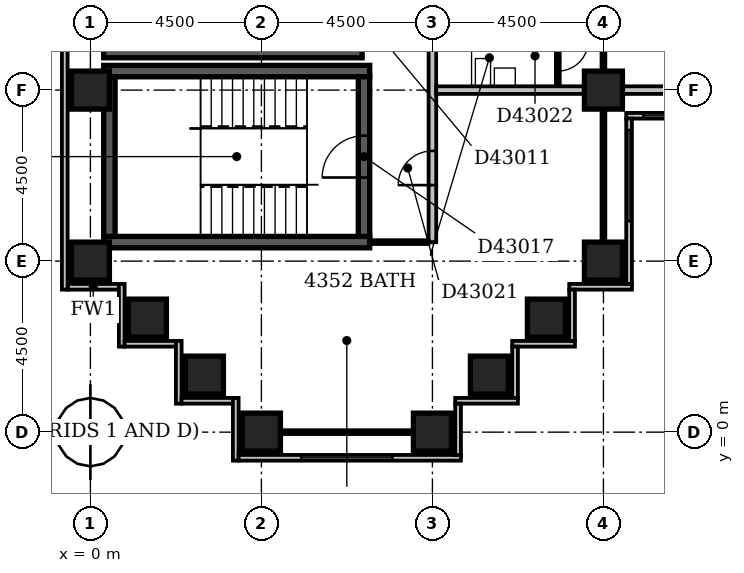
"""IFC4 building model, lengths in metres.
Left out: names, types, materials, properties, quantities, classifications, styles, units other than length and angle.
Written with IfcOpenShell. Run it as: python <this file> out.ifc"""

import sys

from ifc_helpers import new_model, si_unit, direction, frame, frame_2d, origin, origin_2d, place, context, subcontext, project, spatial, rectangle, extrude, element, fill, save


model = new_model("IFC4")
c1 = context("Model", 3, precision=1e-05, world=origin(), true_north=direction((0.0, 1.0)))
c2 = subcontext(c1, "Body", "Model", "MODEL_VIEW")
j1 = project(units=[si_unit("LENGTHUNIT", "METRE"), si_unit("PLANEANGLEUNIT", "RADIAN")], contexts=[c1])
p1 = place(None, origin())
s1 = spatial("IfcSite", under=j1, at=p1, CompositionType="ELEMENT")
p2 = place(p1, origin())
s2 = spatial("IfcBuilding", under=s1, at=p2, CompositionType="ELEMENT")
p3 = place(p2, frame((0.0, 0.0, 170.0)))
s3 = spatial("IfcBuildingStorey", under=s2, at=p3, CompositionType="ELEMENT", Elevation=170.0)
for number, where, z_axis, x_axis in (
    (1, (0.35, 5.0, -0.3), (0.0, 0.0, 1.0), (1.0, 0.0, 0.0)),
    (2, (0.35, 9.5, -0.3), (0.0, 0.0, 1.0), (1.0, 0.0, 0.0)),
):
    element("IfcWall", number, at=place(p3, frame(where, z_axis=z_axis, x_axis=x_axis)), inside=s3, PredefinedType="SHEAR", context=c2, shape_type="SweptSolid", body=[
        extrude(rectangle(XDim=7.0, YDim=0.3, at=frame_2d((3.5, 0.0))), origin(), (0.0, 0.0, 1.0), 3.45),
    ])
p4 = place(p3, frame((0.35, 10.0, -0.3), z_axis=(0.0, 0.0, 1.0), x_axis=(1.0, 0.0, 0.0)))
e3 = element("IfcWall", 3, at=p4, inside=s3, PredefinedType="SHEAR", context=c2, shape_type="SweptSolid", body=[
    extrude(rectangle(XDim=6.8, YDim=0.3, at=frame_2d((3.4, 0.0))), origin(), (0.0, 0.0, 1.0), 3.45),
])
p5 = place(p3, frame((0.5, 5.15, -0.3), z_axis=(0.0, 0.0, 1.0), x_axis=(0.0, 1.0, 0.0)))
e4 = element("IfcWall", 4, at=p5, inside=s3, PredefinedType="SHEAR", context=c2, shape_type="SweptSolid", body=[
    extrude(rectangle(XDim=4.2, YDim=0.3, at=frame_2d((2.1, 0.0))), origin(), (0.0, 0.0, 1.0), 3.45),
])
p6 = place(p3, frame((7.2, 5.15, -0.3), z_axis=(0.0, 0.0, 1.0), x_axis=(0.0, 1.0, 0.0)))
e5 = element("IfcWall", 5, at=p6, inside=s3, PredefinedType="SHEAR", context=c2, shape_type="SweptSolid", body=[
    extrude(rectangle(XDim=4.2, YDim=0.3, at=frame_2d((2.1, 0.0))), origin(), (0.0, 0.0, 1.0), 3.45),
])
p7 = place(p6, frame((1.55, 0.0, 0.3)))
e6 = element("IfcOpeningElement", 6, at=p7, cuts=e5, PredefinedType="OPENING", context=c2, shape_type="SweptSolid", body=[
    extrude(rectangle(XDim=1.1, YDim=2.1, at=frame_2d((0.55, 1.05))), frame((0.0, 0.162, 0.0), z_axis=(0.0, -1.0, 0.0), x_axis=(1.0, 0.0, 0.0)), (0.0, 0.0, 1.0), 0.324),
])
for number, where, z_axis, x_axis in (
    (7, (4.5, 0.0, -0.3), (0.0, 0.0, 1.0), (1.0, 0.0, 0.0)),
    (8, (9.0, 0.0, -0.3), (0.0, 0.0, 1.0), (1.0, 0.0, 0.0)),
    (9, (3.0, 1.5, -0.3), (0.0, 0.0, 1.0), (1.0, 0.0, 0.0)),
    (10, (10.5, 1.5, -0.3), (0.0, 0.0, 1.0), (1.0, 0.0, 0.0)),
    (11, (1.5, 3.0, -0.3), (0.0, 0.0, 1.0), (1.0, 0.0, 0.0)),
    (12, (12.0, 3.0, -0.3), (0.0, 0.0, 1.0), (1.0, 0.0, 0.0)),
    (13, (0.0, 4.5, -0.3), (0.0, 0.0, 1.0), (1.0, 0.0, 0.0)),
    (14, (13.5, 4.5, -0.3), (0.0, 0.0, 1.0), (1.0, 0.0, 0.0)),
    (15, (0.0, 9.0, -0.3), (0.0, 0.0, 1.0), (1.0, 0.0, 0.0)),
    (16, (13.5, 9.0, -0.3), (0.0, 0.0, 1.0), (1.0, 0.0, 0.0)),
):
    element("IfcColumn", number, at=place(p3, frame(where, z_axis=z_axis, x_axis=x_axis)), inside=s3, PredefinedType="COLUMN", context=c2, shape_type="SweptSolid", body=[
        extrude(rectangle(XDim=1.0, YDim=1.0, at=origin_2d()), origin(), (0.0, 0.0, 1.0), 3.45),
    ])
p8 = place(p3, frame((9.675, -0.6, 0.0), z_axis=(0.0, 0.0, 1.0), x_axis=(0.0, 1.0, 0.0)))
e17 = element("IfcWall", 17, at=p8, inside=s3, PredefinedType="STANDARD", context=c2, shape_type="SweptSolid", body=[
    extrude(rectangle(XDim=1.35, YDim=0.15, at=frame_2d((0.675, 0.0))), origin(), (0.0, 0.0, 1.0), 2.5),
])
p9 = place(p3, frame((9.6, 0.825, 0.0), z_axis=(0.0, 0.0, 1.0), x_axis=(1.0, 0.0, 0.0)))
e18 = element("IfcWall", 18, at=p9, inside=s3, PredefinedType="STANDARD", context=c2, shape_type="SweptSolid", body=[
    extrude(rectangle(XDim=1.65, YDim=0.15, at=frame_2d((0.825, 0.0))), origin(), (0.0, 0.0, 1.0), 2.5),
])
p10 = place(p3, frame((11.175, 0.9, 0.0), z_axis=(0.0, 0.0, 1.0), x_axis=(0.0, 1.0, 0.0)))
e19 = element("IfcWall", 19, at=p10, inside=s3, PredefinedType="STANDARD", context=c2, shape_type="SweptSolid", body=[
    extrude(rectangle(XDim=1.35, YDim=0.15, at=frame_2d((0.675, 0.0))), origin(), (0.0, 0.0, 1.0), 2.5),
])
p11 = place(p3, frame((11.1, 2.325, 0.0), z_axis=(0.0, 0.0, 1.0), x_axis=(1.0, 0.0, 0.0)))
e20 = element("IfcWall", 20, at=p11, inside=s3, PredefinedType="STANDARD", context=c2, shape_type="SweptSolid", body=[
    extrude(rectangle(XDim=1.65, YDim=0.15, at=frame_2d((0.825, 0.0))), origin(), (0.0, 0.0, 1.0), 2.5),
])
p12 = place(p3, frame((12.675, 2.4, 0.0), z_axis=(0.0, 0.0, 1.0), x_axis=(0.0, 1.0, 0.0)))
e21 = element("IfcWall", 21, at=p12, inside=s3, PredefinedType="STANDARD", context=c2, shape_type="SweptSolid", body=[
    extrude(rectangle(XDim=1.35, YDim=0.15, at=frame_2d((0.675, 0.0))), origin(), (0.0, 0.0, 1.0), 2.5),
])
p13 = place(p3, frame((12.6, 3.825, 0.0), z_axis=(0.0, 0.0, 1.0), x_axis=(1.0, 0.0, 0.0)))
e22 = element("IfcWall", 22, at=p13, inside=s3, PredefinedType="STANDARD", context=c2, shape_type="SweptSolid", body=[
    extrude(rectangle(XDim=1.65, YDim=0.15, at=frame_2d((0.825, 0.0))), origin(), (0.0, 0.0, 1.0), 2.5),
])
p14 = place(p3, frame((14.175, 3.9, 0.0), z_axis=(0.0, 0.0, 1.0), x_axis=(0.0, 1.0, 0.0)))
e23 = element("IfcWall", 23, at=p14, inside=s3, PredefinedType="STANDARD", context=c2, shape_type="SweptSolid", body=[
    extrude(rectangle(XDim=4.35, YDim=0.15, at=frame_2d((2.175, 0.0))), origin(), (0.0, 0.0, 1.0), 2.5),
])
p15 = place(p14, frame((1.65, 0.0, 0.6)))
e24 = element("IfcOpeningElement", 24, at=p15, cuts=e23, PredefinedType="OPENING", context=c2, shape_type="SweptSolid", body=[
    extrude(rectangle(XDim=2.4, YDim=1.8, at=frame_2d((1.2, 0.9))), frame((0.0, 0.087, 0.0), z_axis=(0.0, -1.0, 0.0), x_axis=(1.0, 0.0, 0.0)), (0.0, 0.0, 1.0), 0.174),
])
p16 = place(p3, frame((14.1, 8.325, 0.0), z_axis=(0.0, 0.0, 1.0), x_axis=(1.0, 0.0, 0.0)))
e25 = element("IfcWall", 25, at=p16, inside=s3, PredefinedType="STANDARD", context=c2, shape_type="SweptSolid", body=[
    extrude(rectangle(XDim=4.65, YDim=0.15, at=frame_2d((2.325, 0.0))), origin(), (0.0, 0.0, 1.0), 2.5),
])
p17 = place(p16, frame((0.45, 0.0, 0.6)))
e26 = element("IfcOpeningElement", 26, at=p17, cuts=e25, PredefinedType="OPENING", context=c2, shape_type="SweptSolid", body=[
    extrude(rectangle(XDim=2.4, YDim=1.8, at=frame_2d((1.2, 0.9))), frame((0.0, 0.087, 0.0), z_axis=(0.0, -1.0, 0.0), x_axis=(1.0, 0.0, 0.0)), (0.0, 0.0, 1.0), 0.174),
])
p18 = place(p3, frame((-0.675, 59.1, 0.0), z_axis=(0.0, 0.0, 1.0), x_axis=(0.0, -1.0, 0.0)))
e27 = element("IfcWall", 27, at=p18, inside=s3, PredefinedType="STANDARD", context=c2, shape_type="SweptSolid", body=[
    extrude(rectangle(XDim=55.35, YDim=0.15, at=frame_2d((27.675, 0.0))), origin(), (0.0, 0.0, 1.0), 2.5),
])
p19 = place(p18, frame((42.15, 0.0, 0.6)))
e28 = element("IfcOpeningElement", 28, at=p19, cuts=e27, PredefinedType="OPENING", context=c2, shape_type="SweptSolid", body=[
    extrude(rectangle(XDim=2.4, YDim=1.8, at=frame_2d((1.2, 0.9))), frame((0.0, 0.087, 0.0), z_axis=(0.0, -1.0, 0.0), x_axis=(1.0, 0.0, 0.0)), (0.0, 0.0, 1.0), 0.174),
])
p20 = place(p3, frame((-0.6, 3.825, 0.0), z_axis=(0.0, 0.0, 1.0), x_axis=(1.0, 0.0, 0.0)))
e29 = element("IfcWall", 29, at=p20, inside=s3, PredefinedType="STANDARD", context=c2, shape_type="SweptSolid", body=[
    extrude(rectangle(XDim=1.35, YDim=0.15, at=frame_2d((0.675, 0.0))), origin(), (0.0, 0.0, 1.0), 2.5),
])
p21 = place(p3, frame((0.825, 3.9, 0.0), z_axis=(0.0, 0.0, 1.0), x_axis=(0.0, -1.0, 0.0)))
e30 = element("IfcWall", 30, at=p21, inside=s3, PredefinedType="STANDARD", context=c2, shape_type="SweptSolid", body=[
    extrude(rectangle(XDim=1.65, YDim=0.15, at=frame_2d((0.825, 0.0))), origin(), (0.0, 0.0, 1.0), 2.5),
])
p22 = place(p3, frame((0.9, 2.325, 0.0), z_axis=(0.0, 0.0, 1.0), x_axis=(1.0, 0.0, 0.0)))
e31 = element("IfcWall", 31, at=p22, inside=s3, PredefinedType="STANDARD", context=c2, shape_type="SweptSolid", body=[
    extrude(rectangle(XDim=1.35, YDim=0.15, at=frame_2d((0.675, 0.0))), origin(), (0.0, 0.0, 1.0), 2.5),
])
p23 = place(p3, frame((2.325, 2.4, 0.0), z_axis=(0.0, 0.0, 1.0), x_axis=(0.0, -1.0, 0.0)))
e32 = element("IfcWall", 32, at=p23, inside=s3, PredefinedType="STANDARD", context=c2, shape_type="SweptSolid", body=[
    extrude(rectangle(XDim=1.65, YDim=0.15, at=frame_2d((0.825, 0.0))), origin(), (0.0, 0.0, 1.0), 2.5),
])
p24 = place(p3, frame((2.4, 0.825, 0.0), z_axis=(0.0, 0.0, 1.0), x_axis=(1.0, 0.0, 0.0)))
e33 = element("IfcWall", 33, at=p24, inside=s3, PredefinedType="STANDARD", context=c2, shape_type="SweptSolid", body=[
    extrude(rectangle(XDim=1.35, YDim=0.15, at=frame_2d((0.675, 0.0))), origin(), (0.0, 0.0, 1.0), 2.5),
])
p25 = place(p3, frame((3.825, 0.9, 0.0), z_axis=(0.0, 0.0, 1.0), x_axis=(0.0, -1.0, 0.0)))
e34 = element("IfcWall", 34, at=p25, inside=s3, PredefinedType="STANDARD", context=c2, shape_type="SweptSolid", body=[
    extrude(rectangle(XDim=1.65, YDim=0.15, at=frame_2d((0.825, 0.0))), origin(), (0.0, 0.0, 1.0), 2.5),
])
p26 = place(p3, frame((3.9, -0.675, 0.0), z_axis=(0.0, 0.0, 1.0), x_axis=(1.0, 0.0, 0.0)))
e35 = element("IfcWall", 35, at=p26, inside=s3, PredefinedType="STANDARD", context=c2, shape_type="SweptSolid", body=[
    extrude(rectangle(XDim=5.85, YDim=0.15, at=frame_2d((2.925, 0.0))), origin(), (0.0, 0.0, 1.0), 2.5),
])
p27 = place(p26, frame((1.65, 0.0, 0.6)))
e36 = element("IfcOpeningElement", 36, at=p27, cuts=e35, PredefinedType="OPENING", context=c2, shape_type="SweptSolid", body=[
    extrude(rectangle(XDim=2.4, YDim=1.8, at=frame_2d((1.2, 0.9))), frame((0.0, 0.087, 0.0), z_axis=(0.0, -1.0, 0.0), x_axis=(1.0, 0.0, 0.0)), (0.0, 0.0, 1.0), 0.174),
])
p28 = place(p3, frame((5.0, 0.0, 0.0), z_axis=(0.0, 0.0, 1.0), x_axis=(1.0, 0.0, 0.0)))
e37 = element("IfcWall", 37, at=p28, inside=s3, PredefinedType="PARTITIONING", context=c2, shape_type="SweptSolid", body=[
    extrude(rectangle(XDim=3.5, YDim=0.1, at=frame_2d((1.75, 0.0))), origin(), (0.0, 0.0, 1.0), 2.5),
])
p29 = place(p3, frame((0.0, 4.5, 0.0), z_axis=(0.0, 0.0, 1.0), x_axis=(0.0, 1.0, 0.0)))
e38 = element("IfcWall", 38, at=p29, inside=s3, PredefinedType="PARTITIONING", context=c2, shape_type="SweptSolid", body=[
    extrude(rectangle(XDim=0.5, YDim=0.1, at=frame_2d((0.25, 0.0))), origin(), (0.0, 0.0, 1.0), 2.5),
])
p30 = place(p3, frame((7.349, 5.0, 0.0), z_axis=(0.0, 0.0, 1.0), x_axis=(1.0, 0.0, 0.0)))
e39 = element("IfcWall", 39, at=p30, inside=s3, PredefinedType="PARTITIONING", context=c2, shape_type="SweptSolid", body=[
    extrude(rectangle(XDim=1.551, YDim=0.1, at=frame_2d((0.775, 0.0))), origin(), (0.0, 0.0, 1.0), 3.15),
])
p31 = place(p3, frame((9.0, 5.0, 0.0), z_axis=(0.0, 0.0, 1.0), x_axis=(0.0, 1.0, 0.0)))
e40 = element("IfcWall", 40, at=p31, inside=s3, PredefinedType="PARTITIONING", context=c2, shape_type="SweptSolid", body=[
    extrude(rectangle(XDim=27.75, YDim=0.2, at=frame_2d((13.875, 0.0))), origin(), (0.0, 0.0, 1.0), 3.15),
])
p32 = place(p31, frame((13.3, 0.0, 0.0)))
e41 = element("IfcOpeningElement", 41, at=p32, cuts=e40, PredefinedType="OPENING", context=c2, shape_type="SweptSolid", body=[
    extrude(rectangle(XDim=1.0, YDim=2.1, at=frame_2d((0.5, 1.05))), frame((0.0, 0.112, 0.0), z_axis=(0.0, -1.0, 0.0), x_axis=(1.0, 0.0, 0.0)), (0.0, 0.0, 1.0), 0.224),
])
p33 = place(p31, frame((10.45, 0.0, 0.0)))
e42 = element("IfcOpeningElement", 42, at=p33, cuts=e40, PredefinedType="OPENING", context=c2, shape_type="SweptSolid", body=[
    extrude(rectangle(XDim=1.0, YDim=2.1, at=frame_2d((0.5, 1.05))), frame((0.0, 0.112, 0.0), z_axis=(0.0, -1.0, 0.0), x_axis=(1.0, 0.0, 0.0)), (0.0, 0.0, 1.0), 0.224),
])
p34 = place(p31, frame((5.95, 0.0, 0.0)))
e43 = element("IfcOpeningElement", 43, at=p34, cuts=e40, PredefinedType="OPENING", context=c2, shape_type="SweptSolid", body=[
    extrude(rectangle(XDim=1.0, YDim=2.1, at=frame_2d((0.5, 1.05))), frame((0.0, 0.112, 0.0), z_axis=(0.0, -1.0, 0.0), x_axis=(1.0, 0.0, 0.0)), (0.0, 0.0, 1.0), 0.224),
])
p35 = place(p31, frame((1.5, 0.0, 0.0)))
e44 = element("IfcOpeningElement", 44, at=p35, cuts=e40, PredefinedType="OPENING", context=c2, shape_type="SweptSolid", body=[
    extrude(rectangle(XDim=0.9, YDim=2.1, at=frame_2d((0.45, 1.05))), frame((0.0, 0.112, 0.0), z_axis=(0.0, -1.0, 0.0), x_axis=(1.0, 0.0, 0.0)), (0.0, 0.0, 1.0), 0.224),
])
p36 = place(p3, frame((13.5, 5.0, 0.0), z_axis=(0.0, 0.0, 1.0), x_axis=(0.0, 1.0, 0.0)))
e45 = element("IfcWall", 45, at=p36, inside=s3, PredefinedType="PARTITIONING", context=c2, shape_type="SweptSolid", body=[
    extrude(rectangle(XDim=3.5, YDim=0.1, at=frame_2d((1.75, 0.0))), origin(), (0.0, 0.0, 1.0), 2.5),
])
p37 = place(p3, frame((9.1, 9.0, 0.0), z_axis=(0.0, 0.0, 1.0), x_axis=(1.0, 0.0, 0.0)))
e46 = element("IfcWall", 46, at=p37, inside=s3, PredefinedType="PARTITIONING", context=c2, shape_type="SweptSolid", body=[
    extrude(rectangle(XDim=3.9, YDim=0.2, at=frame_2d((1.95, 0.0))), origin(), (0.0, 0.0, 1.0), 3.15),
])
p38 = place(p3, frame((14.0, 9.0, 0.0), z_axis=(0.0, 0.0, 1.0), x_axis=(1.0, 0.0, 0.0)))
e47 = element("IfcWall", 47, at=p38, inside=s3, PredefinedType="PARTITIONING", context=c2, shape_type="SweptSolid", body=[
    extrude(rectangle(XDim=3.5, YDim=0.2, at=frame_2d((1.75, 0.0))), origin(), (0.0, 0.0, 1.0), 2.5),
])
p39 = place(p3, frame((12.3, 9.1, 0.0), z_axis=(0.0, 0.0, 1.0), x_axis=(0.0, 1.0, 0.0)))
e48 = element("IfcWall", 48, at=p39, inside=s3, PredefinedType="PARTITIONING", context=c2, shape_type="SweptSolid", body=[
    extrude(rectangle(XDim=1.6, YDim=0.1, at=frame_2d((0.8, 0.0))), origin(), (0.0, 0.0, 1.0), 3.15),
])
p40 = place(p39, frame((0.4, 0.0, 0.0)))
e49 = element("IfcOpeningElement", 49, at=p40, cuts=e48, PredefinedType="OPENING", context=c2, shape_type="SweptSolid", body=[
    extrude(rectangle(XDim=0.8, YDim=2.1, at=frame_2d((0.4, 1.05))), frame((0.0, 0.062, 0.0), z_axis=(0.0, -1.0, 0.0), x_axis=(1.0, 0.0, 0.0)), (0.0, 0.0, 1.0), 0.124),
])
p41 = place(p3, frame((13.5, 9.5, 0.0), z_axis=(0.0, 0.0, 1.0), x_axis=(0.0, 1.0, 0.0)))
e50 = element("IfcWall", 50, at=p41, inside=s3, PredefinedType="PARTITIONING", context=c2, shape_type="SweptSolid", body=[
    extrude(rectangle(XDim=8.4, YDim=0.1, at=frame_2d((4.2, 0.0))), origin(), (0.0, 0.0, 1.0), 3.15),
])
p42 = place(p41, frame((5.8, 0.0, 0.0)))
e51 = element("IfcOpeningElement", 51, at=p42, cuts=e50, PredefinedType="OPENING", context=c2, shape_type="SweptSolid", body=[
    extrude(rectangle(XDim=0.9, YDim=2.1, at=frame_2d((0.45, 1.05))), frame((0.0, 0.062, 0.0), z_axis=(0.0, -1.0, 0.0), x_axis=(1.0, 0.0, 0.0)), (0.0, 0.0, 1.0), 0.124),
])
p43 = place(p41, frame((1.3, 0.0, 0.0)))
e52 = element("IfcOpeningElement", 52, at=p43, cuts=e50, PredefinedType="OPENING", context=c2, shape_type="SweptSolid", body=[
    extrude(rectangle(XDim=0.9, YDim=2.1, at=frame_2d((0.45, 1.05))), frame((0.0, 0.062, 0.0), z_axis=(0.0, -1.0, 0.0), x_axis=(1.0, 0.0, 0.0)), (0.0, 0.0, 1.0), 0.124),
])
p44 = place(p15, origin())
e53 = element("IfcWindow", 53, at=p44, inside=s3, PartitioningType="SINGLE_PANEL", PredefinedType="WINDOW", context=c2, shape_type="SweptSolid", body=[
    extrude(rectangle(XDim=2.4, YDim=1.8, at=frame_2d((1.2, 0.9))), frame((0.0, 0.03, 0.0), z_axis=(0.0, -1.0, 0.0), x_axis=(1.0, 0.0, 0.0)), (0.0, 0.0, 1.0), 0.06),
])
fill(e24, e53)
p45 = place(p17, origin())
e54 = element("IfcWindow", 54, at=p45, inside=s3, PartitioningType="SINGLE_PANEL", PredefinedType="WINDOW", context=c2, shape_type="SweptSolid", body=[
    extrude(rectangle(XDim=2.4, YDim=1.8, at=frame_2d((1.2, 0.9))), frame((0.0, 0.03, 0.0), z_axis=(0.0, -1.0, 0.0), x_axis=(1.0, 0.0, 0.0)), (0.0, 0.0, 1.0), 0.06),
])
fill(e26, e54)
p46 = place(p27, origin())
e55 = element("IfcWindow", 55, at=p46, inside=s3, PartitioningType="SINGLE_PANEL", PredefinedType="WINDOW", context=c2, shape_type="SweptSolid", body=[
    extrude(rectangle(XDim=2.4, YDim=1.8, at=frame_2d((1.2, 0.9))), frame((0.0, 0.03, 0.0), z_axis=(0.0, -1.0, 0.0), x_axis=(1.0, 0.0, 0.0)), (0.0, 0.0, 1.0), 0.06),
])
fill(e36, e55)
p47 = place(p7, origin())
e56 = element("IfcDoor", 56, at=p47, inside=s3, OperationType="SINGLE_SWING_LEFT", PredefinedType="DOOR", context=c2, shape_type="SweptSolid", body=[
    extrude(rectangle(XDim=1.1, YDim=2.1, at=frame_2d((0.55, 1.05))), frame((0.0, 0.025, 0.0), z_axis=(0.0, -1.0, 0.0), x_axis=(1.0, 0.0, 0.0)), (0.0, 0.0, 1.0), 0.05),
])
fill(e6, e56)
p48 = place(p35, origin())
e57 = element("IfcDoor", 57, at=p48, inside=s3, OperationType="SINGLE_SWING_LEFT", PredefinedType="DOOR", context=c2, shape_type="SweptSolid", body=[
    extrude(rectangle(XDim=0.9, YDim=2.1, at=frame_2d((0.45, 1.05))), frame((0.0, 0.025, 0.0), z_axis=(0.0, -1.0, 0.0), x_axis=(1.0, 0.0, 0.0)), (0.0, 0.0, 1.0), 0.05),
])
fill(e44, e57)
p49 = place(p40, origin())
e58 = element("IfcDoor", 58, at=p49, inside=s3, OperationType="SINGLE_SWING_RIGHT", PredefinedType="DOOR", context=c2, shape_type="SweptSolid", body=[
    extrude(rectangle(XDim=0.8, YDim=2.1, at=frame_2d((0.4, 1.05))), frame((0.0, 0.025, 0.0), z_axis=(0.0, -1.0, 0.0), x_axis=(1.0, 0.0, 0.0)), (0.0, 0.0, 1.0), 0.05),
])
fill(e49, e58)
save(model, sys.argv[1])
